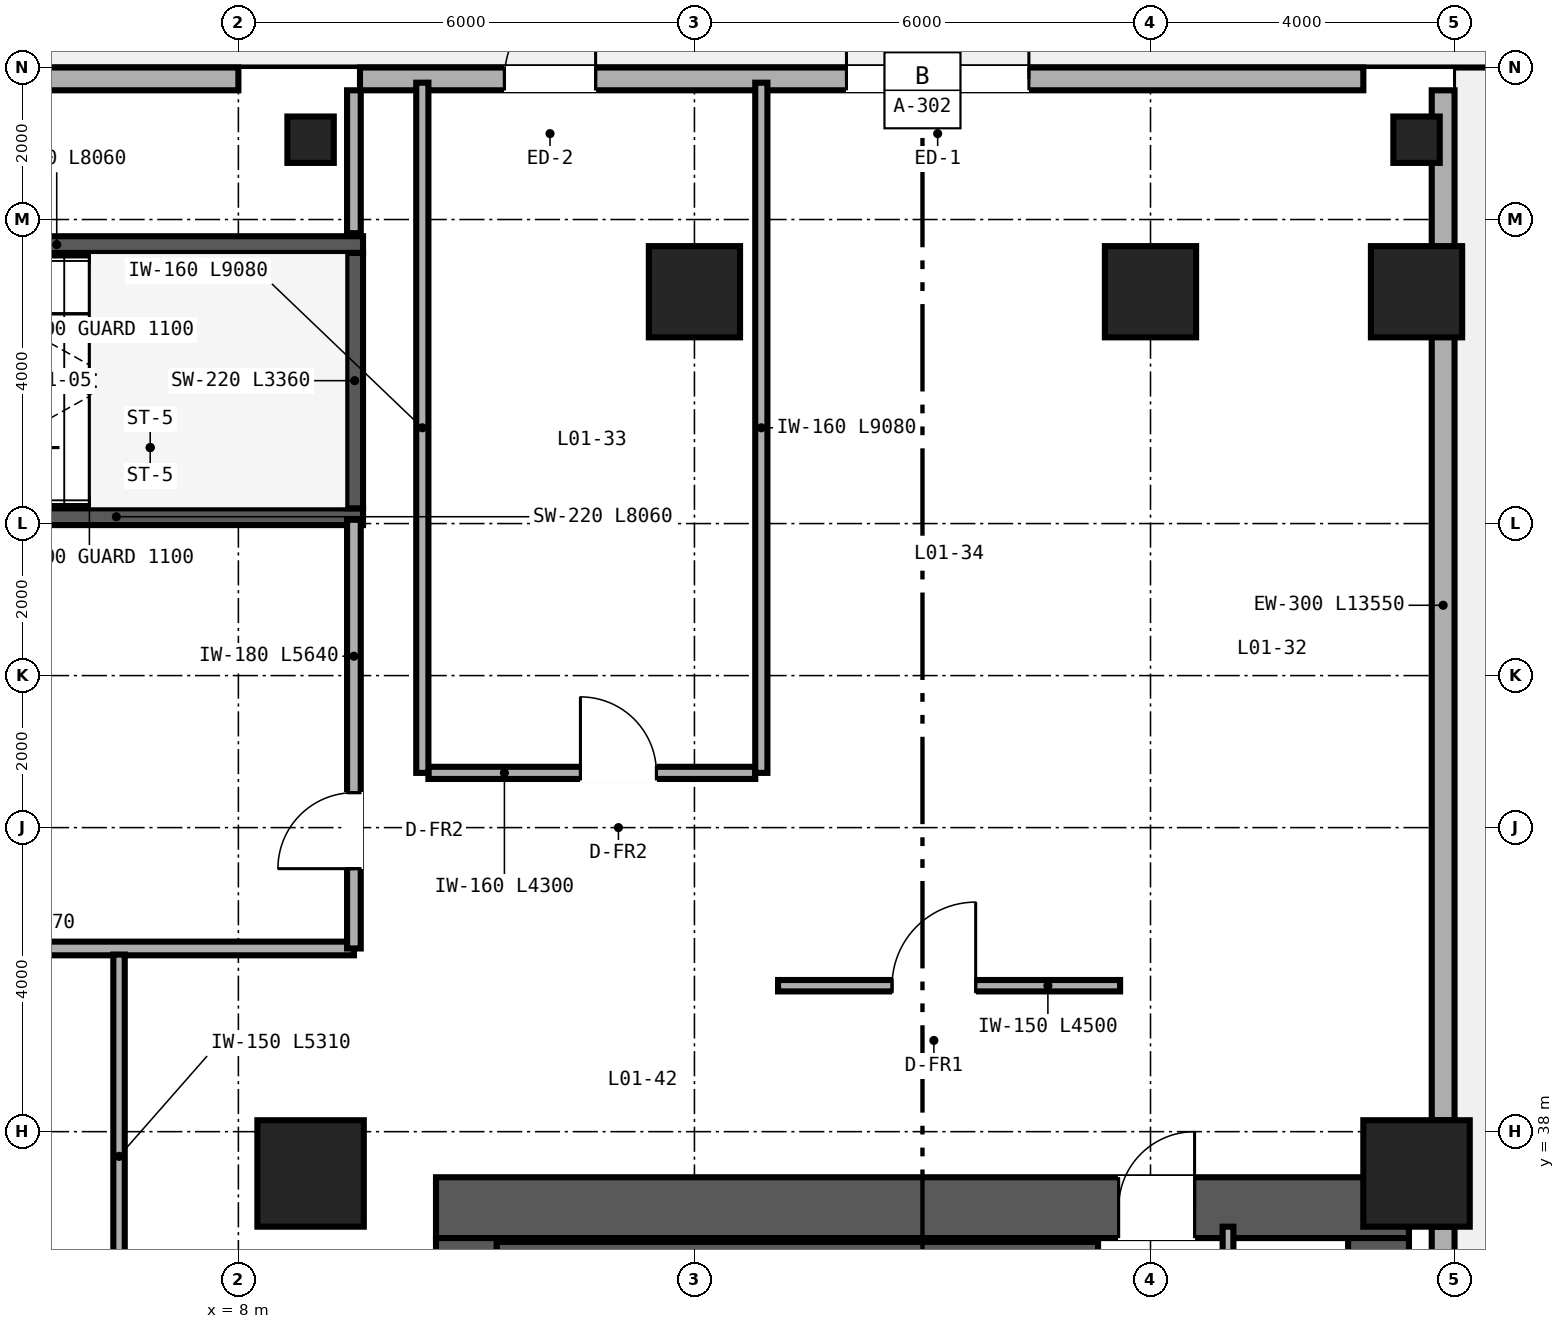
"""IFC4 building model, lengths in metres.
Left out: names, types, materials, properties, quantities, classifications, styles, units other than length and angle.
Written with IfcOpenShell. Run it as: python <this file> out.ifc"""

import sys

from ifc_helpers import new_model, si_unit, direction, frame, frame_2d, origin, origin_2d, place, context, subcontext, project, spatial, rectangle, hollow_circle, extrude, source, transform, mapped, element, fill, save


model = new_model("IFC4")
c1 = context("Model", 3, precision=1e-05, world=origin(), true_north=direction((0.0, 1.0)))
c2 = subcontext(c1, "Body", "Model", "MODEL_VIEW")
j1 = project(units=[si_unit("LENGTHUNIT", "METRE"), si_unit("PLANEANGLEUNIT", "RADIAN")], contexts=[c1])
p1 = place(None, origin())
s1 = spatial("IfcSite", under=j1, at=p1, CompositionType="ELEMENT")
p2 = place(p1, origin())
s2 = spatial("IfcBuilding", under=s1, at=p2, CompositionType="ELEMENT")
p3 = place(p2, origin())
s3 = spatial("IfcBuildingStorey", under=s2, at=p3, CompositionType="ELEMENT", Elevation=0.0)
p4 = place(p3, frame((10.6, 37.0, 0.0), z_axis=(0.0, 0.0, 1.0), x_axis=(1.0, 0.0, 0.0)))
e1 = element("IfcWall", 1, at=p4, inside=s3, PredefinedType="SHEAR", context=c2, shape_type="SweptSolid", body=[
    extrude(rectangle(XDim=12.8, YDim=0.8, at=frame_2d((6.4, 0.0))), origin(), (0.0, 0.0, 1.0), 5.71),
])
p5 = place(p4, frame((8.98, 0.0, 0.0)))
e2 = element("IfcOpeningElement", 2, at=p5, cuts=e1, PredefinedType="OPENING", context=c2, shape_type="SweptSolid", body=[
    extrude(rectangle(XDim=1.0, YDim=2.15, at=frame_2d((0.5, 1.075))), frame((0.0, 0.41, 0.0), z_axis=(0.0, -1.0, 0.0), x_axis=(1.0, 0.0, 0.0)), (0.0, 0.0, 1.0), 0.82),
])
p6 = place(p3, frame((11.0, 15.4, 0.0), z_axis=(0.0, 0.0, 1.0), x_axis=(0.0, 1.0, 0.0)))
e3 = element("IfcWall", 3, at=p6, inside=s3, PredefinedType="SHEAR", context=c2, shape_type="SweptSolid", body=[
    extrude(rectangle(XDim=21.2, YDim=0.8, at=frame_2d((10.6, 0.0))), origin(), (0.0, 0.0, 1.0), 5.71),
])
p7 = place(p6, frame((4.15, 0.0, 0.0)))
e4 = element("IfcOpeningElement", 4, at=p7, cuts=e3, PredefinedType="OPENING", context=c2, shape_type="SweptSolid", body=[
    extrude(rectangle(XDim=1.1, YDim=2.15, at=frame_2d((0.55, 1.075))), frame((0.0, 0.41, 0.0), z_axis=(0.0, -1.0, 0.0), x_axis=(1.0, 0.0, 0.0)), (0.0, 0.0, 1.0), 0.82),
])
p8 = place(p6, frame((16.35, 0.0, 0.0)))
e5 = element("IfcOpeningElement", 5, at=p8, cuts=e3, PredefinedType="OPENING", context=c2, shape_type="SweptSolid", body=[
    extrude(rectangle(XDim=1.1, YDim=2.15, at=frame_2d((0.55, 1.075))), frame((0.0, 0.41, 0.0), z_axis=(0.0, -1.0, 0.0), x_axis=(1.0, 0.0, 0.0)), (0.0, 0.0, 1.0), 0.82),
])
p9 = place(p3, frame((23.0, 15.4, 0.0), z_axis=(0.0, 0.0, 1.0), x_axis=(0.0, 1.0, 0.0)))
e6 = element("IfcWall", 6, at=p9, inside=s3, PredefinedType="SHEAR", context=c2, shape_type="SweptSolid", body=[
    extrude(rectangle(XDim=21.2, YDim=0.8, at=frame_2d((10.6, 0.0))), origin(), (0.0, 0.0, 1.0), 5.71),
])
p10 = place(p3, frame((11.4, 36.44, 0.0), z_axis=(0.0, 0.0, 1.0), x_axis=(1.0, 0.0, 0.0)))
e7 = element("IfcWall", 7, at=p10, inside=s3, PredefinedType="SHEAR", context=c2, shape_type="SweptSolid", body=[
    extrude(rectangle(XDim=7.91, YDim=0.22, at=frame_2d((3.955, 0.0))), origin(), (0.0, 0.0, 1.0), 5.8),
])
p11 = place(p3, frame((1.58, 46.09, 0.0), z_axis=(0.0, 0.0, 1.0), x_axis=(1.0, 0.0, 0.0)))
e8 = element("IfcWall", 8, at=p11, inside=s3, PredefinedType="SHEAR", context=c2, shape_type="SweptSolid", body=[
    extrude(rectangle(XDim=8.06, YDim=0.22, at=frame_2d((4.03, 0.0))), origin(), (0.0, 0.0, 1.0), 5.8),
])
p12 = place(p11, frame((0.47, 0.0, 0.0)))
e9 = element("IfcOpeningElement", 9, at=p12, cuts=e8, PredefinedType="OPENING", context=c2, shape_type="SweptSolid", body=[
    extrude(rectangle(XDim=1.1, YDim=2.15, at=frame_2d((0.55, 1.075))), frame((0.0, 0.12, 0.0), z_axis=(0.0, -1.0, 0.0), x_axis=(1.0, 0.0, 0.0)), (0.0, 0.0, 1.0), 0.24),
])
p13 = place(p3, frame((1.58, 49.67, 0.0), z_axis=(0.0, 0.0, 1.0), x_axis=(1.0, 0.0, 0.0)))
e10 = element("IfcWall", 10, at=p13, inside=s3, PredefinedType="SHEAR", context=c2, shape_type="SweptSolid", body=[
    extrude(rectangle(XDim=8.06, YDim=0.22, at=frame_2d((4.03, 0.0))), origin(), (0.0, 0.0, 1.0), 5.8),
])
p14 = place(p3, frame((9.53, 46.2, 0.0), z_axis=(0.0, 0.0, 1.0), x_axis=(0.0, 1.0, 0.0)))
e11 = element("IfcWall", 11, at=p14, inside=s3, PredefinedType="SHEAR", context=c2, shape_type="SweptSolid", body=[
    extrude(rectangle(XDim=3.36, YDim=0.22, at=frame_2d((1.68, 0.0))), origin(), (0.0, 0.0, 1.0), 5.8),
])
m1 = source(origin(), c2, "Body", "SweptSolid", [
    extrude(hollow_circle(Radius=0.305, WallThickness=0.025, at=origin_2d()), origin(), (0.0, 0.0, 1.0), 5.71),
])
for number, where, z_axis, x_axis in (
    (12, (8.95, 51.05, 0.0), (0.0, 0.0, 1.0), (1.0, 0.0, 0.0)),
    (13, (23.5, 51.05, 0.0), (0.0, 0.0, 1.0), (1.0, 0.0, 0.0)),
):
    element("IfcColumn", number, at=place(p3, frame(where, z_axis=z_axis, x_axis=x_axis)), inside=s3, PredefinedType="COLUMN", context=c2, shape_type="MappedRepresentation", body=[
        mapped(m1, transform((0.0, 0.0, 0.0), scale=1.0)),
    ])
m2 = source(origin(), c2, "Body", "SweptSolid", [
    extrude(rectangle(XDim=1.4, YDim=1.4, at=origin_2d()), origin(), (0.0, 0.0, 1.0), 5.71),
])
for number, where, z_axis, x_axis in (
    (14, (8.95, 37.45, 0.0), (0.0, 0.0, 1.0), (1.0, 0.0, 0.0)),
    (15, (23.5, 37.45, 0.0), (0.0, 0.0, 1.0), (1.0, 0.0, 0.0)),
):
    element("IfcColumn", number, at=place(p3, frame(where, z_axis=z_axis, x_axis=x_axis)), inside=s3, PredefinedType="COLUMN", context=c2, shape_type="MappedRepresentation", body=[
        mapped(m2, transform((0.0, 0.0, 0.0), scale=1.0)),
    ])
m3 = source(origin(), c2, "Body", "SweptSolid", [
    extrude(rectangle(XDim=1.2, YDim=1.2, at=origin_2d()), origin(), (0.0, 0.0, 1.0), 5.71),
])
for number, where, z_axis, x_axis in (
    (16, (14.0, 49.05, 0.0), (0.0, 0.0, 1.0), (1.0, 0.0, 0.0)),
    (17, (20.0, 49.05, 0.0), (0.0, 0.0, 1.0), (1.0, 0.0, 0.0)),
    (18, (23.5, 49.05, 0.0), (0.0, 0.0, 1.0), (1.0, 0.0, 0.0)),
):
    element("IfcColumn", number, at=place(p3, frame(where, z_axis=z_axis, x_axis=x_axis)), inside=s3, PredefinedType="COLUMN", context=c2, shape_type="MappedRepresentation", body=[
        mapped(m3, transform((0.0, 0.0, 0.0), scale=1.0)),
    ])
p15 = place(p3, frame((0.35, 51.85, 0.0), z_axis=(0.0, 0.0, 1.0), x_axis=(1.0, 0.0, 0.0)))
e19 = element("IfcWall", 19, at=p15, inside=s3, PredefinedType="SOLIDWALL", context=c2, shape_type="SweptSolid", body=[
    extrude(rectangle(XDim=7.65, YDim=0.3, at=frame_2d((3.825, 0.0))), origin(), (0.0, 0.0, 1.0), 5.71),
])
p16 = place(p3, frame((9.6, 51.85, 0.0), z_axis=(0.0, 0.0, 1.0), x_axis=(1.0, 0.0, 0.0)))
e20 = element("IfcWall", 20, at=p16, inside=s3, PredefinedType="SOLIDWALL", context=c2, shape_type="SweptSolid", body=[
    extrude(rectangle(XDim=13.2, YDim=0.3, at=frame_2d((6.6, 0.0))), origin(), (0.0, 0.0, 1.0), 5.71),
])
p17 = place(p16, frame((6.4, 0.0, 0.0)))
e21 = element("IfcOpeningElement", 21, at=p17, cuts=e20, PredefinedType="OPENING", context=c2, shape_type="SweptSolid", body=[
    extrude(rectangle(XDim=2.4, YDim=2.6, at=frame_2d((1.2, 1.3))), frame((0.0, 0.16, 0.0), z_axis=(0.0, -1.0, 0.0), x_axis=(1.0, 0.0, 0.0)), (0.0, 0.0, 1.0), 0.32),
])
p18 = place(p16, frame((1.9, 0.0, 0.0)))
e22 = element("IfcOpeningElement", 22, at=p18, cuts=e20, PredefinedType="OPENING", context=c2, shape_type="SweptSolid", body=[
    extrude(rectangle(XDim=1.2, YDim=2.2, at=frame_2d((0.6, 1.1))), frame((0.0, 0.16, 0.0), z_axis=(0.0, -1.0, 0.0), x_axis=(1.0, 0.0, 0.0)), (0.0, 0.0, 1.0), 0.32),
])
p19 = place(p3, frame((23.85, 38.15, 0.0), z_axis=(0.0, 0.0, 1.0), x_axis=(0.0, 1.0, 0.0)))
e23 = element("IfcWall", 23, at=p19, inside=s3, PredefinedType="SOLIDWALL", context=c2, shape_type="SweptSolid", body=[
    extrude(rectangle(XDim=13.55, YDim=0.3, at=frame_2d((6.775, 0.0))), origin(), (0.0, 0.0, 1.0), 4.783),
])
p20 = place(p3, frame((23.85, 28.85, 0.0), z_axis=(0.0, 0.0, 1.0), x_axis=(0.0, 1.0, 0.0)))
e24 = element("IfcWall", 24, at=p20, inside=s3, PredefinedType="SOLIDWALL", context=c2, shape_type="SweptSolid", body=[
    extrude(rectangle(XDim=7.9, YDim=0.3, at=frame_2d((3.95, 0.0))), origin(), (0.0, 0.0, 1.0), 5.253),
])
p21 = place(p3, frame((21.02, 33.28, 0.0), z_axis=(0.0, 0.0, 1.0), x_axis=(0.0, 1.0, 0.0)))
e25 = element("IfcWall", 25, at=p21, inside=s3, PredefinedType="PARTITIONING", context=c2, shape_type="SweptSolid", body=[
    extrude(rectangle(XDim=3.47, YDim=0.142, at=frame_2d((1.735, 0.0))), origin(), (0.0, 0.0, 1.0), 5.71),
])
p22 = place(p21, frame((1.15, 0.0, 0.0)))
e26 = element("IfcOpeningElement", 26, at=p22, cuts=e25, PredefinedType="OPENING", context=c2, shape_type="SweptSolid", body=[
    extrude(rectangle(XDim=0.84, YDim=2.1, at=frame_2d((0.42, 1.05))), frame((0.0, 0.081, 0.0), z_axis=(0.0, -1.0, 0.0), x_axis=(1.0, 0.0, 0.0)), (0.0, 0.0, 1.0), 0.162),
])
p23 = place(p3, frame((10.5, 42.72, 0.0), z_axis=(0.0, 0.0, 1.0), x_axis=(1.0, 0.0, 0.0)))
e27 = element("IfcWall", 27, at=p23, inside=s3, PredefinedType="PARTITIONING", context=c2, shape_type="SweptSolid", body=[
    extrude(rectangle(XDim=4.3, YDim=0.16, at=frame_2d((2.15, 0.0))), origin(), (0.0, 0.0, 1.0), 5.71),
])
p24 = place(p23, frame((2.0, 0.0, 0.0)))
e28 = element("IfcOpeningElement", 28, at=p24, cuts=e27, PredefinedType="OPENING", context=c2, shape_type="SweptSolid", body=[
    extrude(rectangle(XDim=1.0, YDim=2.15, at=frame_2d((0.5, 1.075))), frame((0.0, 0.09, 0.0), z_axis=(0.0, -1.0, 0.0), x_axis=(1.0, 0.0, 0.0)), (0.0, 0.0, 1.0), 0.18),
])
for number, where, z_axis, x_axis in (
    (29, (10.42, 42.72, 0.0), (0.0, 0.0, 1.0), (0.0, 1.0, 0.0)),
    (30, (14.88, 42.72, 0.0), (0.0, 0.0, 1.0), (0.0, 1.0, 0.0)),
):
    element("IfcWall", number, at=place(p3, frame(where, z_axis=z_axis, x_axis=x_axis)), inside=s3, PredefinedType="PARTITIONING", context=c2, shape_type="SweptSolid", body=[
        extrude(rectangle(XDim=9.08, YDim=0.16, at=frame_2d((4.54, 0.0))), origin(), (0.0, 0.0, 1.0), 4.783),
    ])
p25 = place(p3, frame((15.1, 39.92, 0.0), z_axis=(0.0, 0.0, 1.0), x_axis=(1.0, 0.0, 0.0)))
e31 = element("IfcWall", 31, at=p25, inside=s3, PredefinedType="PARTITIONING", context=c2, shape_type="SweptSolid", body=[
    extrude(rectangle(XDim=4.5, YDim=0.15, at=frame_2d((2.25, 0.0))), origin(), (0.0, 0.0, 1.0), 5.71),
])
p26 = place(p25, frame((1.5, 0.0, 0.0)))
e32 = element("IfcOpeningElement", 32, at=p26, cuts=e31, PredefinedType="OPENING", context=c2, shape_type="SweptSolid", body=[
    extrude(rectangle(XDim=1.1, YDim=2.15, at=frame_2d((0.55, 1.075))), frame((0.0, 0.085, 0.0), z_axis=(0.0, -1.0, 0.0), x_axis=(1.0, 0.0, 0.0)), (0.0, 0.0, 1.0), 0.17),
])
p27 = place(p3, frame((0.35, 40.41, 0.0), z_axis=(0.0, 0.0, 1.0), x_axis=(1.0, 0.0, 0.0)))
e33 = element("IfcWall", 33, at=p27, inside=s3, PredefinedType="SOLIDWALL", context=c2, shape_type="SweptSolid", body=[
    extrude(rectangle(XDim=9.17, YDim=0.18, at=frame_2d((4.585, 0.0))), origin(), (0.0, 0.0, 1.0), 4.931),
])
p28 = place(p3, frame((9.52, 40.41, 0.0), z_axis=(0.0, 0.0, 1.0), x_axis=(0.0, 1.0, 0.0)))
e34 = element("IfcWall", 34, at=p28, inside=s3, PredefinedType="SOLIDWALL", context=c2, shape_type="SweptSolid", body=[
    extrude(rectangle(XDim=5.64, YDim=0.18, at=frame_2d((2.82, 0.0))), origin(), (0.0, 0.0, 1.0), 5.71),
])
p29 = place(p28, frame((1.05, 0.0, 0.0)))
e35 = element("IfcOpeningElement", 35, at=p29, cuts=e34, PredefinedType="OPENING", context=c2, shape_type="SweptSolid", body=[
    extrude(rectangle(XDim=1.0, YDim=2.15, at=frame_2d((0.5, 1.075))), frame((0.0, 0.1, 0.0), z_axis=(0.0, -1.0, 0.0), x_axis=(1.0, 0.0, 0.0)), (0.0, 0.0, 1.0), 0.2),
])
p30 = place(p3, frame((9.52, 49.82, 0.0), z_axis=(0.0, 0.0, 1.0), x_axis=(0.0, 1.0, 0.0)))
e36 = element("IfcWall", 36, at=p30, inside=s3, PredefinedType="SOLIDWALL", context=c2, shape_type="SweptSolid", body=[
    extrude(rectangle(XDim=1.88, YDim=0.18, at=frame_2d((0.94, 0.0))), origin(), (0.0, 0.0, 1.0), 4.783),
])
p31 = place(p3, frame((6.43, 35.02, 0.0), z_axis=(0.0, 0.0, 1.0), x_axis=(0.0, 1.0, 0.0)))
e37 = element("IfcWall", 37, at=p31, inside=s3, PredefinedType="PARTITIONING", context=c2, shape_type="SweptSolid", body=[
    extrude(rectangle(XDim=5.31, YDim=0.15, at=frame_2d((2.655, 0.0))), origin(), (0.0, 0.0, 1.0), 5.71),
])
m4 = source(origin(), c2, "Body", "SweptSolid", [
    extrude(rectangle(XDim=2.4, YDim=2.6, at=frame_2d((1.2, 1.3))), frame((0.0, 0.025, 0.0), z_axis=(0.0, -1.0, 0.0), x_axis=(1.0, 0.0, 0.0)), (0.0, 0.0, 1.0), 0.05),
])
p32 = place(p17, origin())
e38 = element("IfcDoor", 38, at=p32, inside=s3, OperationType="DOUBLE_DOOR_SINGLE_SWING", PredefinedType="DOOR", context=c2, shape_type="MappedRepresentation", body=[
    mapped(m4, transform((0.0, 0.0, 0.0), scale=1.0)),
])
fill(e21, e38)
m5 = source(origin(), c2, "Body", "SweptSolid", [
    extrude(rectangle(XDim=1.2, YDim=2.2, at=frame_2d((0.6, 1.1))), frame((0.0, 0.025, 0.0), z_axis=(0.0, -1.0, 0.0), x_axis=(1.0, 0.0, 0.0)), (0.0, 0.0, 1.0), 0.05),
])
p33 = place(p18, origin())
e39 = element("IfcDoor", 39, at=p33, inside=s3, OperationType="SINGLE_SWING_RIGHT", PredefinedType="DOOR", context=c2, shape_type="MappedRepresentation", body=[
    mapped(m5, transform((0.0, 0.0, 0.0), scale=1.0)),
])
fill(e22, e39)
m6 = source(origin(), c2, "Body", "SweptSolid", [
    extrude(rectangle(XDim=1.0, YDim=2.15, at=frame_2d((0.5, 1.075))), frame((0.0, 0.025, 0.0), z_axis=(0.0, -1.0, 0.0), x_axis=(1.0, 0.0, 0.0)), (0.0, 0.0, 1.0), 0.05),
])
p34 = place(p5, origin())
e40 = element("IfcDoor", 40, at=p34, inside=s3, OperationType="SINGLE_SWING_RIGHT", PredefinedType="DOOR", context=c2, shape_type="MappedRepresentation", body=[
    mapped(m6, transform((0.0, 0.0, 0.0), scale=1.0)),
])
fill(e2, e40)
p35 = place(p24, origin())
e41 = element("IfcDoor", 41, at=p35, inside=s3, OperationType="SINGLE_SWING_LEFT", PredefinedType="DOOR", context=c2, shape_type="MappedRepresentation", body=[
    mapped(m6, transform((0.0, 0.0, 0.0), scale=1.0)),
])
fill(e28, e41)
m7 = source(origin(), c2, "Body", "SweptSolid", [
    extrude(rectangle(XDim=1.1, YDim=2.15, at=frame_2d((0.55, 1.075))), frame((0.0, 0.025, 0.0), z_axis=(0.0, -1.0, 0.0), x_axis=(1.0, 0.0, 0.0)), (0.0, 0.0, 1.0), 0.05),
])
p36 = place(p26, origin())
e42 = element("IfcDoor", 42, at=p36, inside=s3, OperationType="SINGLE_SWING_RIGHT", PredefinedType="DOOR", context=c2, shape_type="MappedRepresentation", body=[
    mapped(m7, transform((0.0, 0.0, 0.0), scale=1.0)),
])
fill(e32, e42)
p37 = place(p29, origin())
e43 = element("IfcDoor", 43, at=p37, inside=s3, OperationType="SINGLE_SWING_LEFT", PredefinedType="DOOR", context=c2, shape_type="MappedRepresentation", body=[
    mapped(m6, transform((0.0, 0.0, 0.0), scale=1.0)),
])
fill(e35, e43)
save(model, sys.argv[1])
